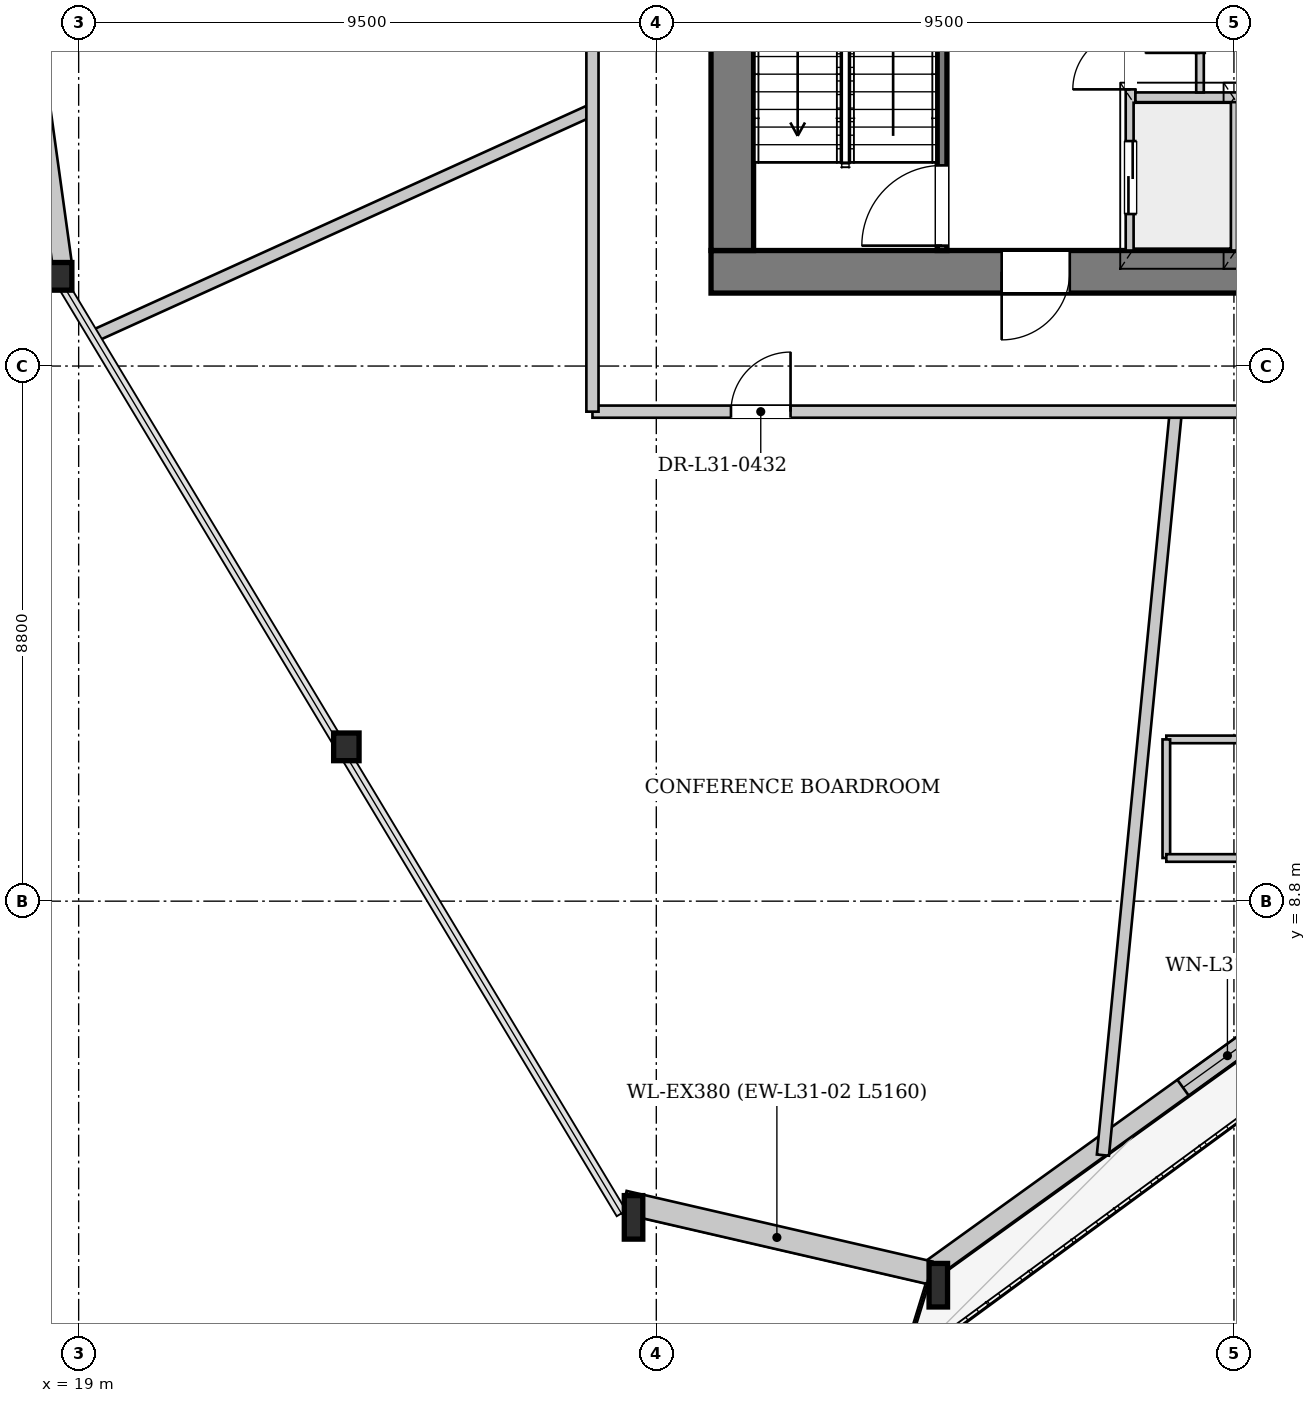
"""IFC4 building model, lengths in metres.
Left out: names, types, materials, properties, quantities, classifications, styles, units other than length and angle.
Written with IfcOpenShell. Run it as: python <this file> out.ifc"""

import sys

from ifc_helpers import new_model, si_unit, direction, frame, frame_2d, origin, origin_2d, place, context, subcontext, project, spatial, rectangle, i_section, extrude, source, transform, mapped, element, fill, save


model = new_model("IFC4")
c1 = context("Model", 3, precision=1e-05, world=origin(), true_north=direction((0.0, 1.0)))
c2 = subcontext(c1, "Body", "Model", "MODEL_VIEW")
j1 = project(units=[si_unit("LENGTHUNIT", "METRE"), si_unit("PLANEANGLEUNIT", "RADIAN")], contexts=[c1])
p1 = place(None, origin())
s1 = spatial("IfcSite", under=j1, at=p1, CompositionType="ELEMENT")
p2 = place(p1, origin())
s2 = spatial("IfcBuilding", under=s1, at=p2, CompositionType="ELEMENT")
p3 = place(p2, frame((0.0, 0.0, 119.9)))
s3 = spatial("IfcBuildingStorey", under=s2, at=p3, CompositionType="ELEMENT", Elevation=119.9)
m1 = source(origin(), c2, "Body", "SweptSolid", [
    extrude(i_section(OverallWidth=0.418, OverallDepth=0.455, WebThickness=0.038, FlangeThickness=0.059, at=origin_2d()), origin(), (0.0, 0.0, 1.0), 3.402),
])
p4 = place(p3, frame((18.576, 19.21, 0.0), z_axis=(0.060711197165, -0.079441247354, 0.994989064642), x_axis=(0.794541150271, 0.607210309963, 0.0)))
e1 = element("IfcColumn", 1, at=p4, inside=s3, PredefinedType="COLUMN", context=c2, shape_type="MappedRepresentation", body=[
    mapped(m1, transform((0.0, 0.0, 0.0), x_axis=(1.0, 0.0, 0.0), y_axis=(0.0, 1.0, 0.0), z_axis=(0.0, 0.0, 1.0), scale=1.0)),
])
m2 = source(origin(), c2, "Body", "SweptSolid", [
    extrude(i_section(OverallWidth=0.418, OverallDepth=0.455, WebThickness=0.038, FlangeThickness=0.059, at=origin_2d()), origin(), (0.0, 0.0, 1.0), 3.404),
])
p5 = place(p3, frame((23.251, 11.438, 0.0), z_axis=(0.088782597364, -0.058662491634, 0.994322061749), x_axis=(0.551274020056, 0.834324250403, 0.0)))
e2 = element("IfcColumn", 2, at=p5, inside=s3, PredefinedType="COLUMN", context=c2, shape_type="MappedRepresentation", body=[
    mapped(m2, transform((0.0, 0.0, 0.0), x_axis=(1.0, 0.0, 0.0), y_axis=(0.0, 1.0, 0.0), z_axis=(0.0, 0.0, 1.0), scale=1.0)),
])
m3 = source(origin(), c2, "Body", "SweptSolid", [
    extrude(i_section(OverallWidth=0.304, OverallDepth=0.716, WebThickness=0.021, FlangeThickness=0.04, at=origin_2d()), origin(), (0.0, 0.0, 1.0), 3.411),
])
p6 = place(p3, frame((27.927, 3.665, 0.0), z_axis=(0.116885882362, -0.037936018158, 0.992420550488), x_axis=(0.308704106049, 0.951158122979, 0.0)))
e3 = element("IfcColumn", 3, at=p6, inside=s3, PredefinedType="COLUMN", context=c2, shape_type="MappedRepresentation", body=[
    mapped(m3, transform((0.0, 0.0, 0.0), x_axis=(1.0, 0.0, 0.0), y_axis=(0.0, 1.0, 0.0), z_axis=(0.0, 0.0, 1.0), scale=1.0)),
])
m4 = source(origin(), c2, "Body", "SweptSolid", [
    extrude(i_section(OverallWidth=0.304, OverallDepth=0.716, WebThickness=0.021, FlangeThickness=0.04, at=origin_2d()), origin(), (0.0, 0.0, 1.0), 3.405),
])
p7 = place(p3, frame((32.955, 2.504, 0.0), z_axis=(0.107551210574, -0.011615530742, 0.994131689742), x_axis=(0.107375600964, 0.994218527446, 0.0)))
e4 = element("IfcColumn", 4, at=p7, inside=s3, PredefinedType="COLUMN", context=c2, shape_type="MappedRepresentation", body=[
    mapped(m4, transform((0.0, 0.0, 0.0), x_axis=(1.0, 0.0, 0.0), y_axis=(0.0, 1.0, 0.0), z_axis=(0.0, 0.0, 1.0), scale=1.0)),
])
p8 = place(p3, frame((52.216, 16.579, 0.0), z_axis=(0.0, 0.0, 1.0), x_axis=(-0.811343672804, -0.584569452334, 0.0)))
e5 = element("IfcWall", 5, at=p8, inside=s3, PredefinedType="SOLIDWALL", context=c2, shape_type="SweptSolid", body=[
    extrude(rectangle(XDim=23.855, YDim=0.32, at=frame_2d((11.927, 0.0))), origin(), (0.0, 0.0, 1.0), 2.692),
])
p9 = place(p8, frame((7.834, 0.0, 0.0)))
e6 = element("IfcOpeningElement", 6, at=p9, cuts=e5, PredefinedType="OPENING", context=c2, shape_type="SweptSolid", body=[
    extrude(rectangle(XDim=1.1, YDim=2.3, at=frame_2d((0.55, 1.15))), frame((0.0, 0.17, 0.0), z_axis=(0.0, -1.0, 0.0), x_axis=(1.0, 0.0, 0.0)), (0.0, 0.0, 1.0), 0.34),
])
p10 = place(p8, frame((16.753, 0.0, 0.372)))
e7 = element("IfcOpeningElement", 7, at=p10, cuts=e5, PredefinedType="OPENING", context=c2, shape_type="SweptSolid", body=[
    extrude(rectangle(XDim=1.8, YDim=2.2, at=frame_2d((0.9, 1.1))), frame((0.0, 0.17, 0.0), z_axis=(0.0, -1.0, 0.0), x_axis=(1.0, 0.0, 0.0)), (0.0, 0.0, 1.0), 0.34),
])
p11 = place(p8, frame((3.191, 0.0, 0.65)))
e8 = element("IfcOpeningElement", 8, at=p11, cuts=e5, PredefinedType="OPENING", context=c2, shape_type="SweptSolid", body=[
    extrude(rectangle(XDim=1.2, YDim=1.5, at=frame_2d((0.6, 0.75))), frame((0.0, 0.17, 0.0), z_axis=(0.0, -1.0, 0.0), x_axis=(1.0, 0.0, 0.0)), (0.0, 0.0, 1.0), 0.34),
])
p12 = place(p3, frame((32.997, 2.689, 0.0), z_axis=(0.0, 0.0, 1.0), x_axis=(-0.97437763842, 0.22491824681, 0.0)))
e9 = element("IfcWall", 9, at=p12, inside=s3, PredefinedType="SOLIDWALL", context=c2, shape_type="SweptSolid", body=[
    extrude(rectangle(XDim=5.16, YDim=0.38, at=frame_2d((2.58, 0.0))), origin(), (0.0, 0.0, 1.0), 2.692),
])
p13 = place(p3, frame((18.735, 19.232, 0.0), z_axis=(0.0, 0.0, 1.0), x_axis=(-0.137044979398, 0.990564825553, 0.0)))
e10 = element("IfcWall", 10, at=p13, inside=s3, PredefinedType="SOLIDWALL", context=c2, shape_type="SweptSolid", body=[
    extrude(rectangle(XDim=18.141, YDim=0.32, at=frame_2d((9.07, 0.0))), origin(), (0.0, 0.0, 1.0), 2.692),
])
p14 = place(p13, frame((5.255, 0.0, 0.0)))
e11 = element("IfcOpeningElement", 11, at=p14, cuts=e10, PredefinedType="OPENING", context=c2, shape_type="SweptSolid", body=[
    extrude(rectangle(XDim=1.1, YDim=2.3, at=frame_2d((0.55, 1.15))), frame((0.0, 0.17, 0.0), z_axis=(0.0, -1.0, 0.0), x_axis=(1.0, 0.0, 0.0)), (0.0, 0.0, 1.0), 0.34),
])
p15 = place(p13, frame((12.524, 0.0, 0.372)))
e12 = element("IfcOpeningElement", 12, at=p15, cuts=e10, PredefinedType="OPENING", context=c2, shape_type="SweptSolid", body=[
    extrude(rectangle(XDim=1.8, YDim=2.2, at=frame_2d((0.9, 1.1))), frame((0.0, 0.17, 0.0), z_axis=(0.0, -1.0, 0.0), x_axis=(1.0, 0.0, 0.0)), (0.0, 0.0, 1.0), 0.34),
])
p16 = place(p3, frame((46.6, 19.15, 0.0), z_axis=(0.0, 0.0, 1.0), x_axis=(-1.0, 0.0, 0.0)))
e13 = element("IfcWall", 13, at=p16, inside=s3, PredefinedType="SHEAR", context=c2, shape_type="SweptSolid", body=[
    extrude(rectangle(XDim=17.2, YDim=0.7, at=frame_2d((8.6, 0.0))), origin(), (0.0, 0.0, 1.0), 3.3),
])
p17 = place(p16, frame((4.8, 0.0, 0.0)))
e14 = element("IfcOpeningElement", 14, at=p17, cuts=e13, PredefinedType="OPENING", context=c2, shape_type="SweptSolid", body=[
    extrude(rectangle(XDim=1.12, YDim=2.25, at=frame_2d((0.56, 1.125))), frame((0.0, 0.36, 0.0), z_axis=(0.0, -1.0, 0.0), x_axis=(1.0, 0.0, 0.0)), (0.0, 0.0, 1.0), 0.72),
])
p18 = place(p16, frame((11.3, 0.0, 0.0)))
e15 = element("IfcOpeningElement", 15, at=p18, cuts=e13, PredefinedType="OPENING", context=c2, shape_type="SweptSolid", body=[
    extrude(rectangle(XDim=1.12, YDim=2.25, at=frame_2d((0.56, 1.125))), frame((0.0, 0.36, 0.0), z_axis=(0.0, -1.0, 0.0), x_axis=(1.0, 0.0, 0.0)), (0.0, 0.0, 1.0), 0.72),
])
p19 = place(p3, frame((29.75, 19.5, 0.0), z_axis=(0.0, 0.0, 1.0), x_axis=(0.0, 1.0, 0.0)))
e16 = element("IfcWall", 16, at=p19, inside=s3, PredefinedType="SHEAR", context=c2, shape_type="SweptSolid", body=[
    extrude(rectangle(XDim=14.2, YDim=0.7, at=frame_2d((7.1, 0.0))), origin(), (0.0, 0.0, 1.0), 3.3),
])
p20 = place(p19, frame((7.42, 0.0, 0.0)))
e17 = element("IfcOpeningElement", 17, at=p20, cuts=e16, PredefinedType="OPENING", context=c2, shape_type="SweptSolid", body=[
    extrude(rectangle(XDim=1.6, YDim=2.2, at=frame_2d((0.8, 1.1))), frame((0.0, 0.36, 0.0), z_axis=(0.0, -1.0, 0.0), x_axis=(1.0, 0.0, 0.0)), (0.0, 0.0, 1.0), 0.72),
])
p21 = place(p3, frame((33.2, 19.5, 0.0), z_axis=(0.0, 0.0, 1.0), x_axis=(0.0, 1.0, 0.0)))
e18 = element("IfcWall", 18, at=p21, inside=s3, PredefinedType="PARTITIONING", context=c2, shape_type="SweptSolid", body=[
    extrude(rectangle(XDim=7.46, YDim=0.16, at=frame_2d((3.73, 0.0))), origin(), (0.0, 0.0, 1.0), 3.3),
])
p22 = place(p21, frame((0.08, 0.0, 0.0)))
e19 = element("IfcOpeningElement", 19, at=p22, cuts=e18, PredefinedType="OPENING", context=c2, shape_type="SweptSolid", body=[
    extrude(rectangle(XDim=1.32, YDim=2.2, at=frame_2d((0.66, 1.1))), frame((0.0, 0.09, 0.0), z_axis=(0.0, -1.0, 0.0), x_axis=(1.0, 0.0, 0.0)), (0.0, 0.0, 1.0), 0.18),
])
p23 = place(p3, frame((36.3, 19.5, 0.0), z_axis=(0.0, 0.0, 1.0), x_axis=(0.0, 1.0, 0.0)))
e20 = element("IfcWall", 20, at=p23, inside=s3, PredefinedType="PARTITIONING", context=c2, shape_type="SweptSolid", body=[
    extrude(rectangle(XDim=4.78, YDim=0.16, at=frame_2d((2.39, 0.0))), origin(), (0.0, 0.0, 1.0), 3.3),
])
p24 = place(p23, frame((0.6, 0.0, 0.0)))
e21 = element("IfcOpeningElement", 21, at=p24, cuts=e20, PredefinedType="OPENING", context=c2, shape_type="SweptSolid", body=[
    extrude(rectangle(XDim=1.2, YDim=2.2, at=frame_2d((0.6, 1.1))), frame((0.0, 0.09, 0.0), z_axis=(0.0, -1.0, 0.0), x_axis=(1.0, 0.0, 0.0)), (0.0, 0.0, 1.0), 0.18),
])
p25 = place(p23, frame((2.65, 0.0, 0.0)))
e22 = element("IfcOpeningElement", 22, at=p25, cuts=e20, PredefinedType="OPENING", context=c2, shape_type="SweptSolid", body=[
    extrude(rectangle(XDim=0.95, YDim=2.1, at=frame_2d((0.475, 1.05))), frame((0.0, 0.09, 0.0), z_axis=(0.0, -1.0, 0.0), x_axis=(1.0, 0.0, 0.0)), (0.0, 0.0, 1.0), 0.18),
])
p26 = place(p3, frame((38.0, 19.5, 0.0), z_axis=(0.0, 0.0, 1.0), x_axis=(0.0, 1.0, 0.0)))
e23 = element("IfcWall", 23, at=p26, inside=s3, PredefinedType="PARTITIONING", context=c2, shape_type="SweptSolid", body=[
    extrude(rectangle(XDim=2.46, YDim=0.125, at=frame_2d((1.23, 0.0))), origin(), (0.0, 0.0, 1.0), 3.3),
])
p27 = place(p3, frame((36.38, 22.02, 0.0), z_axis=(0.0, 0.0, 1.0), x_axis=(1.0, 0.0, 0.0)))
e24 = element("IfcWall", 24, at=p27, inside=s3, PredefinedType="PARTITIONING", context=c2, shape_type="SweptSolid", body=[
    extrude(rectangle(XDim=3.24, YDim=0.16, at=frame_2d((1.62, 0.0))), origin(), (0.0, 0.0, 1.0), 3.3),
])
p28 = place(p3, frame((37.442, 22.1, 0.0), z_axis=(0.0, 0.0, 1.0), x_axis=(0.0, 1.0, 0.0)))
e25 = element("IfcWall", 25, at=p28, inside=s3, PredefinedType="PARTITIONING", context=c2, shape_type="SweptSolid", body=[
    extrude(rectangle(XDim=2.18, YDim=0.125, at=frame_2d((1.09, 0.0))), origin(), (0.0, 0.0, 1.0), 3.3),
])
p29 = place(p28, frame((0.65, 0.0, 0.0)))
e26 = element("IfcOpeningElement", 26, at=p29, cuts=e25, PredefinedType="OPENING", context=c2, shape_type="SweptSolid", body=[
    extrude(rectangle(XDim=0.9, YDim=2.1, at=frame_2d((0.45, 1.05))), frame((0.0, 0.073, 0.0), z_axis=(0.0, -1.0, 0.0), x_axis=(1.0, 0.0, 0.0)), (0.0, 0.0, 1.0), 0.145),
])
p30 = place(p3, frame((27.45, 21.814, 0.0), z_axis=(0.0, 0.0, 1.0), x_axis=(-0.910689415533, -0.413091743366, 0.0)))
e27 = element("IfcWall", 27, at=p30, inside=s3, PredefinedType="PARTITIONING", context=c2, shape_type="SweptSolid", body=[
    extrude(rectangle(XDim=8.976, YDim=0.2, at=frame_2d((4.488, 0.0))), origin(), (0.0, 0.0, 1.0), 3.3),
])
p31 = place(p3, frame((37.044, 16.85, 0.0), z_axis=(0.0, 0.0, 1.0), x_axis=(-0.097575283555, -0.995228146728, 0.0)))
e28 = element("IfcWall", 28, at=p31, inside=s3, PredefinedType="PARTITIONING", context=c2, shape_type="SweptSolid", body=[
    extrude(rectangle(XDim=12.285, YDim=0.2, at=frame_2d((6.143, 0.0))), origin(), (0.0, 0.0, 1.0), 3.3),
])
p32 = place(p3, frame((39.288, 11.46, 0.0), z_axis=(0.0, 0.0, 1.0), x_axis=(-1.0, 0.0, 0.0)))
e29 = element("IfcWall", 29, at=p32, inside=s3, PredefinedType="PARTITIONING", context=c2, shape_type="SweptSolid", body=[
    extrude(rectangle(XDim=2.4, YDim=0.125, at=frame_2d((1.2, 0.0))), origin(), (0.0, 0.0, 1.0), 2.925),
])
p33 = place(p3, frame((36.888, 11.46, 0.0), z_axis=(0.0, 0.0, 1.0), x_axis=(0.0, -1.0, 0.0)))
e30 = element("IfcWall", 30, at=p33, inside=s3, PredefinedType="PARTITIONING", context=c2, shape_type="SweptSolid", body=[
    extrude(rectangle(XDim=1.95, YDim=0.125, at=frame_2d((0.975, 0.0))), origin(), (0.0, 0.0, 1.0), 3.3),
])
p34 = place(p3, frame((36.888, 9.51, 0.0), z_axis=(0.0, 0.0, 1.0), x_axis=(1.0, 0.0, 0.0)))
e31 = element("IfcWall", 31, at=p34, inside=s3, PredefinedType="PARTITIONING", context=c2, shape_type="SweptSolid", body=[
    extrude(rectangle(XDim=2.4, YDim=0.125, at=frame_2d((1.2, 0.0))), origin(), (0.0, 0.0, 1.0), 3.3),
])
p35 = place(p3, frame((27.45, 16.85, 0.0), z_axis=(0.0, 0.0, 1.0), x_axis=(1.0, 0.0, 0.0)))
e32 = element("IfcWall", 32, at=p35, inside=s3, PredefinedType="PARTITIONING", context=c2, shape_type="SweptSolid", body=[
    extrude(rectangle(XDim=21.1, YDim=0.2, at=frame_2d((10.55, 0.0))), origin(), (0.0, 0.0, 1.0), 2.925),
])
p36 = place(p35, frame((19.82, 0.0, 0.0)))
e33 = element("IfcOpeningElement", 33, at=p36, cuts=e32, PredefinedType="OPENING", context=c2, shape_type="SweptSolid", body=[
    extrude(rectangle(XDim=0.98, YDim=2.15, at=frame_2d((0.49, 1.075))), frame((0.0, 0.11, 0.0), z_axis=(0.0, -1.0, 0.0), x_axis=(1.0, 0.0, 0.0)), (0.0, 0.0, 1.0), 0.22),
])
p37 = place(p35, frame((2.278, 0.0, 0.0)))
e34 = element("IfcOpeningElement", 34, at=p37, cuts=e32, PredefinedType="OPENING", context=c2, shape_type="SweptSolid", body=[
    extrude(rectangle(XDim=0.98, YDim=2.15, at=frame_2d((0.49, 1.075))), frame((0.0, 0.11, 0.0), z_axis=(0.0, -1.0, 0.0), x_axis=(1.0, 0.0, 0.0)), (0.0, 0.0, 1.0), 0.22),
])
p38 = place(p35, frame((13.469, 0.0, 0.0)))
e35 = element("IfcOpeningElement", 35, at=p38, cuts=e32, PredefinedType="OPENING", context=c2, shape_type="SweptSolid", body=[
    extrude(rectangle(XDim=0.98, YDim=2.15, at=frame_2d((0.49, 1.075))), frame((0.0, 0.11, 0.0), z_axis=(0.0, -1.0, 0.0), x_axis=(1.0, 0.0, 0.0)), (0.0, 0.0, 1.0), 0.22),
])
p39 = place(p3, frame((27.45, 16.85, 0.0), z_axis=(0.0, 0.0, 1.0), x_axis=(0.0, 1.0, 0.0)))
e36 = element("IfcWall", 36, at=p39, inside=s3, PredefinedType="PARTITIONING", context=c2, shape_type="SweptSolid", body=[
    extrude(rectangle(XDim=19.5, YDim=0.2, at=frame_2d((9.75, 0.0))), origin(), (0.0, 0.0, 1.0), 3.3),
])
p40 = place(p39, frame((18.22, 0.0, 0.0)))
e37 = element("IfcOpeningElement", 37, at=p40, cuts=e36, PredefinedType="OPENING", context=c2, shape_type="SweptSolid", body=[
    extrude(rectangle(XDim=0.98, YDim=2.15, at=frame_2d((0.49, 1.075))), frame((0.0, 0.11, 0.0), z_axis=(0.0, -1.0, 0.0), x_axis=(1.0, 0.0, 0.0)), (0.0, 0.0, 1.0), 0.22),
])
p41 = place(p39, frame((8.504, 0.0, 0.0)))
e38 = element("IfcOpeningElement", 38, at=p41, cuts=e36, PredefinedType="OPENING", context=c2, shape_type="SweptSolid", body=[
    extrude(rectangle(XDim=0.98, YDim=2.15, at=frame_2d((0.49, 1.075))), frame((0.0, 0.11, 0.0), z_axis=(0.0, -1.0, 0.0), x_axis=(1.0, 0.0, 0.0)), (0.0, 0.0, 1.0), 0.22),
])
m5 = source(origin(), c2, "Body", "SweptSolid", [
    extrude(rectangle(XDim=1.8, YDim=2.2, at=frame_2d((0.9, 1.1))), frame((0.0, 0.03, 0.0), z_axis=(0.0, -1.0, 0.0), x_axis=(1.0, 0.0, 0.0)), (0.0, 0.0, 1.0), 0.06),
])
p42 = place(p10, origin())
e39 = element("IfcWindow", 39, at=p42, inside=s3, PartitioningType="SINGLE_PANEL", PredefinedType="WINDOW", context=c2, shape_type="MappedRepresentation", body=[
    mapped(m5, transform((0.0, 0.0, 0.0), x_axis=(1.0, 0.0, 0.0), y_axis=(0.0, 1.0, 0.0), z_axis=(0.0, 0.0, 1.0), scale=1.0)),
])
fill(e7, e39)
m6 = source(origin(), c2, "Body", "SweptSolid", [
    extrude(rectangle(XDim=1.12, YDim=2.25, at=frame_2d((0.56, 1.125))), frame((0.0, 0.025, 0.0), z_axis=(0.0, -1.0, 0.0), x_axis=(1.0, 0.0, 0.0)), (0.0, 0.0, 1.0), 0.05),
])
p43 = place(p18, origin())
e40 = element("IfcDoor", 40, at=p43, inside=s3, OperationType="SINGLE_SWING_RIGHT", PredefinedType="DOOR", context=c2, shape_type="MappedRepresentation", body=[
    mapped(m6, transform((0.0, 0.0, 0.0), x_axis=(1.0, 0.0, 0.0), y_axis=(0.0, 1.0, 0.0), z_axis=(0.0, 0.0, 1.0), scale=1.0)),
])
fill(e15, e40)
m7 = source(origin(), c2, "Body", "SweptSolid", [
    extrude(rectangle(XDim=1.32, YDim=2.2, at=frame_2d((0.66, 1.1))), frame((0.0, 0.025, 0.0), z_axis=(0.0, -1.0, 0.0), x_axis=(1.0, 0.0, 0.0)), (0.0, 0.0, 1.0), 0.05),
])
p44 = place(p22, origin())
e41 = element("IfcDoor", 41, at=p44, inside=s3, OperationType="SINGLE_SWING_LEFT", PredefinedType="DOOR", context=c2, shape_type="MappedRepresentation", body=[
    mapped(m7, transform((0.0, 0.0, 0.0), x_axis=(1.0, 0.0, 0.0), y_axis=(0.0, 1.0, 0.0), z_axis=(0.0, 0.0, 1.0), scale=1.0)),
])
fill(e19, e41)
m8 = source(origin(), c2, "Body", "SweptSolid", [
    extrude(rectangle(XDim=1.2, YDim=2.2, at=frame_2d((0.6, 1.1))), frame((0.0, 0.025, 0.0), z_axis=(0.0, -1.0, 0.0), x_axis=(1.0, 0.0, 0.0)), (0.0, 0.0, 1.0), 0.05),
])
p45 = place(p24, origin())
e42 = element("IfcDoor", 42, at=p45, inside=s3, OperationType="DOUBLE_DOOR_SLIDING", PredefinedType="DOOR", context=c2, shape_type="MappedRepresentation", body=[
    mapped(m8, transform((0.0, 0.0, 0.0), x_axis=(1.0, 0.0, 0.0), y_axis=(0.0, 1.0, 0.0), z_axis=(0.0, 0.0, 1.0), scale=1.0)),
])
fill(e21, e42)
m9 = source(origin(), c2, "Body", "SweptSolid", [
    extrude(rectangle(XDim=0.95, YDim=2.1, at=frame_2d((0.475, 1.05))), frame((0.0, 0.025, 0.0), z_axis=(0.0, -1.0, 0.0), x_axis=(1.0, 0.0, 0.0)), (0.0, 0.0, 1.0), 0.05),
])
p46 = place(p25, origin())
e43 = element("IfcDoor", 43, at=p46, inside=s3, OperationType="SINGLE_SWING_LEFT", PredefinedType="DOOR", context=c2, shape_type="MappedRepresentation", body=[
    mapped(m9, transform((0.0, 0.0, 0.0), x_axis=(1.0, 0.0, 0.0), y_axis=(0.0, 1.0, 0.0), z_axis=(0.0, 0.0, 1.0), scale=1.0)),
])
fill(e22, e43)
m10 = source(origin(), c2, "Body", "SweptSolid", [
    extrude(rectangle(XDim=0.9, YDim=2.1, at=frame_2d((0.45, 1.05))), frame((0.0, 0.025, 0.0), z_axis=(0.0, -1.0, 0.0), x_axis=(1.0, 0.0, 0.0)), (0.0, 0.0, 1.0), 0.05),
])
p47 = place(p29, origin())
e44 = element("IfcDoor", 44, at=p47, inside=s3, OperationType="SINGLE_SWING_LEFT", PredefinedType="DOOR", context=c2, shape_type="MappedRepresentation", body=[
    mapped(m10, transform((0.0, 0.0, 0.0), x_axis=(1.0, 0.0, 0.0), y_axis=(0.0, 1.0, 0.0), z_axis=(0.0, 0.0, 1.0), scale=1.0)),
])
fill(e26, e44)
m11 = source(origin(), c2, "Body", "SweptSolid", [
    extrude(rectangle(XDim=0.98, YDim=2.15, at=frame_2d((0.49, 1.075))), frame((0.0, 0.025, 0.0), z_axis=(0.0, -1.0, 0.0), x_axis=(1.0, 0.0, 0.0)), (0.0, 0.0, 1.0), 0.05),
])
p48 = place(p37, origin())
e45 = element("IfcDoor", 45, at=p48, inside=s3, OperationType="SINGLE_SWING_RIGHT", PredefinedType="DOOR", context=c2, shape_type="MappedRepresentation", body=[
    mapped(m11, transform((0.0, 0.0, 0.0), x_axis=(1.0, 0.0, 0.0), y_axis=(0.0, 1.0, 0.0), z_axis=(0.0, 0.0, 1.0), scale=1.0)),
])
fill(e34, e45)
save(model, sys.argv[1])
